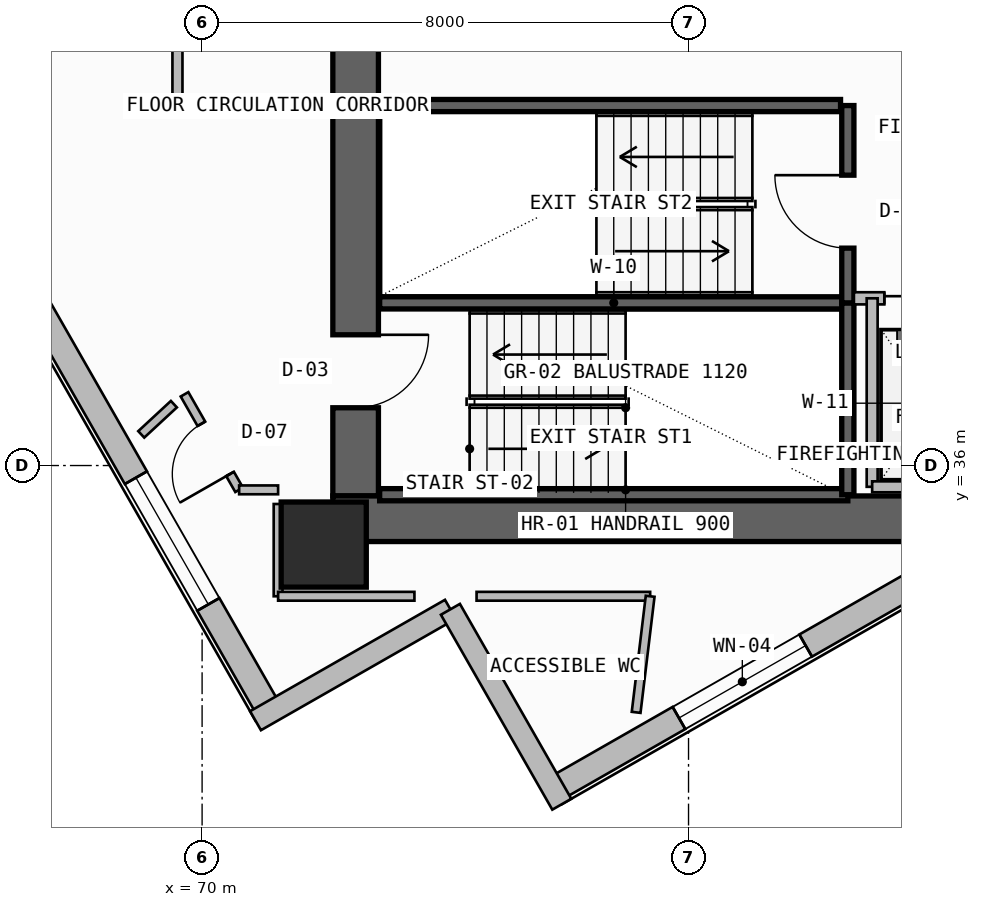
"""IFC4 building model, lengths in metres.
Left out: names, types, materials, properties, quantities, classifications, styles, units other than length and angle.
Written with IfcOpenShell. Run it as: python <this file> out.ifc"""

import sys

from ifc_helpers import new_model, si_unit, direction, frame, frame_2d, origin, origin_2d, place, context, subcontext, project, spatial, rectangle, extrude, element, fill, save


model = new_model("IFC4")
c1 = context("Model", 3, precision=1e-05, world=origin(), true_north=direction((0.0, 1.0)))
c2 = subcontext(c1, "Body", "Model", "MODEL_VIEW")
j1 = project(units=[si_unit("LENGTHUNIT", "METRE"), si_unit("PLANEANGLEUNIT", "RADIAN")], contexts=[c1])
p1 = place(None, origin())
s1 = spatial("IfcSite", under=j1, at=p1, CompositionType="ELEMENT")
p2 = place(p1, origin())
s2 = spatial("IfcBuilding", under=s1, at=p2, CompositionType="ELEMENT")
p3 = place(p2, frame((0.0, 0.0, 200.9)))
s3 = spatial("IfcBuildingStorey", under=s2, at=p3, CompositionType="ELEMENT", Elevation=200.9)
p4 = place(p3, frame((72.525, 35.5, -0.4), z_axis=(0.0, 0.0, 1.0), x_axis=(0.0, 1.0, 0.0)))
e1 = element("IfcWall", 1, at=p4, inside=s3, PredefinedType="SHEAR", context=c2, shape_type="SweptSolid", body=[
    extrude(rectangle(XDim=7.85, YDim=0.75, at=frame_2d((3.925, 0.0))), origin(), (0.0, 0.0, 1.0), 3.66),
])
p5 = place(p4, frame((1.45, 0.0, 0.4)))
e2 = element("IfcOpeningElement", 2, at=p5, cuts=e1, PredefinedType="OPENING", context=c2, shape_type="SweptSolid", body=[
    extrude(rectangle(XDim=1.2, YDim=2.2, at=frame_2d((0.6, 1.1))), frame((0.0, 0.385, 0.0), z_axis=(0.0, -1.0, 0.0), x_axis=(1.0, 0.0, 0.0)), (0.0, 0.0, 1.0), 0.77),
])
p6 = place(p3, frame((72.15, 35.125, -0.4), z_axis=(0.0, 0.0, 1.0), x_axis=(1.0, 0.0, 0.0)))
e3 = element("IfcWall", 3, at=p6, inside=s3, PredefinedType="SHEAR", context=c2, shape_type="SweptSolid", body=[
    extrude(rectangle(XDim=13.6, YDim=0.75, at=frame_2d((6.8, 0.0))), origin(), (0.0, 0.0, 1.0), 3.66),
])
p7 = place(p3, frame((72.0, 34.7, 0.0), z_axis=(0.0, 0.0, 1.0), x_axis=(1.0, 0.0, 0.0)))
e4 = element("IfcColumn", 4, at=p7, inside=s3, PredefinedType="COLUMN", context=c2, shape_type="SweptSolid", body=[
    extrude(rectangle(XDim=1.4, YDim=1.4, at=origin_2d()), origin(), (0.0, 0.0, 1.0), 3.52),
])
p8 = place(p3, frame((75.779, 30.669, 0.0), z_axis=(0.0, 0.0, 1.0), x_axis=(0.868213158215, 0.496191406519, 0.0)))
e5 = element("IfcWall", 5, at=p8, inside=s3, PredefinedType="SOLIDWALL", context=c2, shape_type="SweptSolid", body=[
    extrude(rectangle(XDim=7.015, YDim=0.42, at=frame_2d((3.508, 0.0))), origin(), (0.0, 0.0, 1.0), 3.26),
])
p9 = place(p8, frame((2.377, 0.0, 1.1)))
e6 = element("IfcOpeningElement", 6, at=p9, cuts=e5, PredefinedType="OPENING", context=c2, shape_type="SweptSolid", body=[
    extrude(rectangle(XDim=2.4, YDim=1.2, at=frame_2d((1.2, 0.6))), frame((0.0, 0.22, 0.0), z_axis=(0.0, -1.0, 0.0), x_axis=(1.0, 0.0, 0.0)), (0.0, 0.0, 1.0), 0.44),
])
p10 = place(p3, frame((64.874, 42.864, 0.0), z_axis=(0.0, 0.0, 1.0), x_axis=(0.49622043329, -0.868196568517, 0.0)))
e7 = element("IfcWall", 7, at=p10, inside=s3, PredefinedType="SOLIDWALL", context=c2, shape_type="SweptSolid", body=[
    extrude(rectangle(XDim=12.582, YDim=0.42, at=frame_2d((6.291, 0.0))), origin(), (0.0, 0.0, 1.0), 2.645),
])
p11 = place(p10, frame((8.136, 0.0, 1.1)))
e8 = element("IfcOpeningElement", 8, at=p11, cuts=e7, PredefinedType="OPENING", context=c2, shape_type="SweptSolid", body=[
    extrude(rectangle(XDim=2.4, YDim=1.2, at=frame_2d((1.2, 0.6))), frame((0.0, 0.22, 0.0), z_axis=(0.0, -1.0, 0.0), x_axis=(1.0, 0.0, 0.0)), (0.0, 0.0, 1.0), 0.44),
])
for number, where, z_axis, x_axis in (
    (9, (70.878, 31.803, 0.0), (0.0, 0.0, 1.0), (0.868, 0.496, 0.0)),
    (10, (74.084, 33.635, 0.0), (0.0, 0.0, 1.0), (0.496, -0.868, 0.0)),
):
    element("IfcWall", number, at=place(p3, frame(where, z_axis=z_axis, x_axis=x_axis)), inside=s3, PredefinedType="SOLIDWALL", context=c2, shape_type="SweptSolid", body=[
        extrude(rectangle(XDim=3.692, YDim=0.36, at=frame_2d((1.846, 0.0))), origin(), (0.0, 0.0, 1.0), 3.26),
    ])
for number, where, z_axis, x_axis in (
    (11, (72.92, 35.52, -0.4), (0.0, 0.0, 1.0), (1.0, 0.0, 0.0)),
    (12, (72.92, 38.675, -0.4), (0.0, 0.0, 1.0), (1.0, 0.0, 0.0)),
):
    element("IfcWall", number, at=place(p3, frame(where, z_axis=z_axis, x_axis=x_axis)), inside=s3, PredefinedType="SOLIDWALL", context=c2, shape_type="SweptSolid", body=[
        extrude(rectangle(XDim=7.7, YDim=0.2, at=frame_2d((3.85, 0.0))), origin(), (0.0, 0.0, 1.0), 3.66),
    ])
p12 = place(p3, frame((80.62, 35.52, -0.4), z_axis=(0.0, 0.0, 1.0), x_axis=(0.0, 1.0, 0.0)))
e13 = element("IfcWall", 13, at=p12, inside=s3, PredefinedType="SOLIDWALL", context=c2, shape_type="SweptSolid", body=[
    extrude(rectangle(XDim=3.155, YDim=0.2, at=frame_2d((1.578, 0.0))), origin(), (0.0, 0.0, 1.0), 3.66),
])
p13 = place(p3, frame((80.62, 38.675, -0.4), z_axis=(0.0, 0.0, 1.0), x_axis=(0.0, 1.0, 0.0)))
e14 = element("IfcWall", 14, at=p13, inside=s3, PredefinedType="SOLIDWALL", context=c2, shape_type="SweptSolid", body=[
    extrude(rectangle(XDim=3.245, YDim=0.2, at=frame_2d((1.623, 0.0))), origin(), (0.0, 0.0, 1.0), 3.66),
])
p14 = place(p13, frame((0.9, 0.0, 0.4)))
e15 = element("IfcOpeningElement", 15, at=p14, cuts=e14, PredefinedType="OPENING", context=c2, shape_type="SweptSolid", body=[
    extrude(rectangle(XDim=1.2, YDim=2.2, at=frame_2d((0.6, 1.1))), frame((0.0, 0.11, 0.0), z_axis=(0.0, -1.0, 0.0), x_axis=(1.0, 0.0, 0.0)), (0.0, 0.0, 1.0), 0.22),
])
p15 = place(p3, frame((80.72, 38.75, 0.0), z_axis=(0.0, 0.0, 1.0), x_axis=(1.0, 0.0, 0.0)))
e16 = element("IfcWall", 16, at=p15, inside=s3, PredefinedType="SOLIDWALL", context=c2, shape_type="SweptSolid", body=[
    extrude(rectangle(XDim=4.26, YDim=0.2, at=frame_2d((2.13, 0.0))), origin(), (0.0, 0.0, 1.0), 3.26),
])
p16 = place(p15, frame((0.5, 0.0, 0.0)))
e17 = element("IfcOpeningElement", 17, at=p16, cuts=e16, PredefinedType="OPENING", context=c2, shape_type="SweptSolid", body=[
    extrude(rectangle(XDim=1.3, YDim=2.3, at=frame_2d((0.65, 1.15))), frame((0.0, 0.11, 0.0), z_axis=(0.0, -1.0, 0.0), x_axis=(1.0, 0.0, 0.0)), (0.0, 0.0, 1.0), 0.22),
])
p17 = place(p15, frame((2.45, 0.0, 0.0)))
e18 = element("IfcOpeningElement", 18, at=p17, cuts=e16, PredefinedType="OPENING", context=c2, shape_type="SweptSolid", body=[
    extrude(rectangle(XDim=1.3, YDim=2.3, at=frame_2d((0.65, 1.15))), frame((0.0, 0.11, 0.0), z_axis=(0.0, -1.0, 0.0), x_axis=(1.0, 0.0, 0.0)), (0.0, 0.0, 1.0), 0.22),
])
p18 = place(p3, frame((81.02, 35.65, 0.0), z_axis=(0.0, 0.0, 1.0), x_axis=(0.0, 1.0, 0.0)))
e19 = element("IfcWall", 19, at=p18, inside=s3, PredefinedType="SOLIDWALL", context=c2, shape_type="SweptSolid", body=[
    extrude(rectangle(XDim=3.1, YDim=0.18, at=frame_2d((1.55, 0.0))), origin(), (0.0, 0.0, 1.0), 3.26),
])
p19 = place(p3, frame((81.02, 35.65, 0.0), z_axis=(0.0, 0.0, 1.0), x_axis=(1.0, 0.0, 0.0)))
e20 = element("IfcWall", 20, at=p19, inside=s3, PredefinedType="SOLIDWALL", context=c2, shape_type="SweptSolid", body=[
    extrude(rectangle(XDim=3.93, YDim=0.18, at=frame_2d((1.965, 0.0))), origin(), (0.0, 0.0, 1.0), 3.26),
])
p20 = place(p3, frame((72.92, 41.92, -0.4), z_axis=(0.0, 0.0, 1.0), x_axis=(1.0, 0.0, 0.0)))
e21 = element("IfcWall", 21, at=p20, inside=s3, PredefinedType="SOLIDWALL", context=c2, shape_type="SweptSolid", body=[
    extrude(rectangle(XDim=7.58, YDim=0.2, at=frame_2d((3.79, 0.0))), origin(), (0.0, 0.0, 1.0), 3.66),
])
p21 = place(p3, frame((69.711, 37.171, 0.0), z_axis=(0.0, 0.0, 1.0), x_axis=(0.4963277983, -0.868135194906, 0.0)))
e22 = element("IfcWall", 22, at=p21, inside=s3, PredefinedType="PARTITIONING", context=c2, shape_type="SweptSolid", body=[
    extrude(rectangle(XDim=1.81, YDim=0.145, at=frame_2d((0.905, 0.0))), origin(), (0.0, 0.0, 1.0), 3.26),
])
p22 = place(p21, frame((0.559, 0.0, 0.0)))
e23 = element("IfcOpeningElement", 23, at=p22, cuts=e22, PredefinedType="OPENING", context=c2, shape_type="SweptSolid", body=[
    extrude(rectangle(XDim=0.95, YDim=2.15, at=frame_2d((0.475, 1.075))), frame((0.0, 0.083, 0.0), z_axis=(0.0, -1.0, 0.0), x_axis=(1.0, 0.0, 0.0)), (0.0, 0.0, 1.0), 0.165),
])
p23 = place(p3, frame((70.609, 35.6, 0.0), z_axis=(0.0, 0.0, 1.0), x_axis=(1.0, 0.0, 0.0)))
e24 = element("IfcWall", 24, at=p23, inside=s3, PredefinedType="PARTITIONING", context=c2, shape_type="SweptSolid", body=[
    extrude(rectangle(XDim=0.641, YDim=0.145, at=frame_2d((0.32, 0.0))), origin(), (0.0, 0.0, 1.0), 3.26),
])
p24 = place(p3, frame((69.594, 48.733, 0.0), z_axis=(0.0, 0.0, 1.0), x_axis=(0.0, -1.0, 0.0)))
e25 = element("IfcWall", 25, at=p24, inside=s3, PredefinedType="PARTITIONING", context=c2, shape_type="SweptSolid", body=[
    extrude(rectangle(XDim=6.739, YDim=0.165, at=frame_2d((3.37, 0.0))), origin(), (0.0, 0.0, 1.0), 3.26),
])
p25 = place(p24, frame((2.869, 0.0, 0.0)))
e26 = element("IfcOpeningElement", 26, at=p25, cuts=e25, PredefinedType="OPENING", context=c2, shape_type="SweptSolid", body=[
    extrude(rectangle(XDim=1.0, YDim=2.2, at=frame_2d((0.5, 1.1))), frame((0.0, 0.093, 0.0), z_axis=(0.0, -1.0, 0.0), x_axis=(1.0, 0.0, 0.0)), (0.0, 0.0, 1.0), 0.185),
])
p26 = place(p3, frame((71.25, 35.367, 0.0), z_axis=(0.0, 0.0, 1.0), x_axis=(0.0, -1.0, 0.0)))
e27 = element("IfcWall", 27, at=p26, inside=s3, PredefinedType="PARTITIONING", context=c2, shape_type="SweptSolid", body=[
    extrude(rectangle(XDim=1.517, YDim=0.145, at=frame_2d((0.759, 0.0))), origin(), (0.0, 0.0, 1.0), 3.26),
])
p27 = place(p3, frame((71.25, 33.85, 0.0), z_axis=(0.0, 0.0, 1.0), x_axis=(1.0, 0.0, 0.0)))
e28 = element("IfcWall", 28, at=p27, inside=s3, PredefinedType="PARTITIONING", context=c2, shape_type="SweptSolid", body=[
    extrude(rectangle(XDim=2.242, YDim=0.145, at=frame_2d((1.121, 0.0))), origin(), (0.0, 0.0, 1.0), 3.26),
])
p28 = place(p3, frame((74.514, 33.85, 0.0), z_axis=(0.0, 0.0, 1.0), x_axis=(1.0, 0.0, 0.0)))
e29 = element("IfcWall", 29, at=p28, inside=s3, PredefinedType="PARTITIONING", context=c2, shape_type="SweptSolid", body=[
    extrude(rectangle(XDim=2.855, YDim=0.145, at=frame_2d((1.427, 0.0))), origin(), (0.0, 0.0, 1.0), 3.26),
])
p29 = place(p3, frame((77.369, 33.85, 0.0), z_axis=(0.0, 0.0, 1.0), x_axis=(-0.119971178943, -0.992777374955, 0.0)))
e30 = element("IfcWall", 30, at=p29, inside=s3, PredefinedType="PARTITIONING", context=c2, shape_type="SweptSolid", body=[
    extrude(rectangle(XDim=1.923, YDim=0.145, at=frame_2d((0.961, 0.0))), origin(), (0.0, 0.0, 1.0), 3.26),
])
p30 = place(p3, frame((68.999, 36.512, 0.0), z_axis=(0.0, 0.0, 1.0), x_axis=(0.733791493526, 0.679374744916, 0.0)))
e31 = element("IfcWall", 31, at=p30, inside=s3, PredefinedType="PARTITIONING", context=c2, shape_type="SweptSolid", body=[
    extrude(rectangle(XDim=0.731, YDim=0.145, at=frame_2d((0.366, 0.0))), origin(), (0.0, 0.0, 1.0), 3.26),
])
p31 = place(p9, origin())
e32 = element("IfcWindow", 32, at=p31, inside=s3, PartitioningType="SINGLE_PANEL", PredefinedType="WINDOW", context=c2, shape_type="SweptSolid", body=[
    extrude(rectangle(XDim=2.4, YDim=1.2, at=frame_2d((1.2, 0.6))), frame((0.0, 0.03, 0.0), z_axis=(0.0, -1.0, 0.0), x_axis=(1.0, 0.0, 0.0)), (0.0, 0.0, 1.0), 0.06),
])
fill(e6, e32)
p32 = place(p11, origin())
e33 = element("IfcWindow", 33, at=p32, inside=s3, PartitioningType="SINGLE_PANEL", PredefinedType="WINDOW", context=c2, shape_type="SweptSolid", body=[
    extrude(rectangle(XDim=2.4, YDim=1.2, at=frame_2d((1.2, 0.6))), frame((0.0, 0.03, 0.0), z_axis=(0.0, -1.0, 0.0), x_axis=(1.0, 0.0, 0.0)), (0.0, 0.0, 1.0), 0.06),
])
fill(e8, e33)
p33 = place(p5, frame((1.2, 0.0, 0.0), z_axis=(0.0, 0.0, 1.0), x_axis=(-1.0, 0.0, 0.0)))
e34 = element("IfcDoor", 34, at=p33, inside=s3, OperationType="SINGLE_SWING_LEFT", PredefinedType="USERDEFINED", context=c2, shape_type="SweptSolid", body=[
    extrude(rectangle(XDim=1.2, YDim=2.2, at=frame_2d((0.6, 1.1))), frame((0.0, 0.025, 0.0), z_axis=(0.0, -1.0, 0.0), x_axis=(1.0, 0.0, 0.0)), (0.0, 0.0, 1.0), 0.05),
])
fill(e2, e34)
p34 = place(p14, origin())
e35 = element("IfcDoor", 35, at=p34, inside=s3, OperationType="SINGLE_SWING_RIGHT", PredefinedType="USERDEFINED", context=c2, shape_type="SweptSolid", body=[
    extrude(rectangle(XDim=1.2, YDim=2.2, at=frame_2d((0.6, 1.1))), frame((0.0, 0.025, 0.0), z_axis=(0.0, -1.0, 0.0), x_axis=(1.0, 0.0, 0.0)), (0.0, 0.0, 1.0), 0.05),
])
fill(e15, e35)
p35 = place(p16, origin())
e36 = element("IfcDoor", 36, at=p35, inside=s3, OperationType="DOUBLE_DOOR_SLIDING", PredefinedType="DOOR", context=c2, shape_type="SweptSolid", body=[
    extrude(rectangle(XDim=1.3, YDim=2.3, at=frame_2d((0.65, 1.15))), frame((0.0, 0.025, 0.0), z_axis=(0.0, -1.0, 0.0), x_axis=(1.0, 0.0, 0.0)), (0.0, 0.0, 1.0), 0.05),
])
fill(e17, e36)
p36 = place(p22, frame((0.95, 0.0, 0.0), z_axis=(0.0, 0.0, 1.0), x_axis=(-1.0, 0.0, 0.0)))
e37 = element("IfcDoor", 37, at=p36, inside=s3, OperationType="SINGLE_SWING_LEFT", PredefinedType="DOOR", context=c2, shape_type="SweptSolid", body=[
    extrude(rectangle(XDim=0.95, YDim=2.15, at=frame_2d((0.475, 1.075))), frame((0.0, 0.025, 0.0), z_axis=(0.0, -1.0, 0.0), x_axis=(1.0, 0.0, 0.0)), (0.0, 0.0, 1.0), 0.05),
])
fill(e23, e37)
save(model, sys.argv[1])
